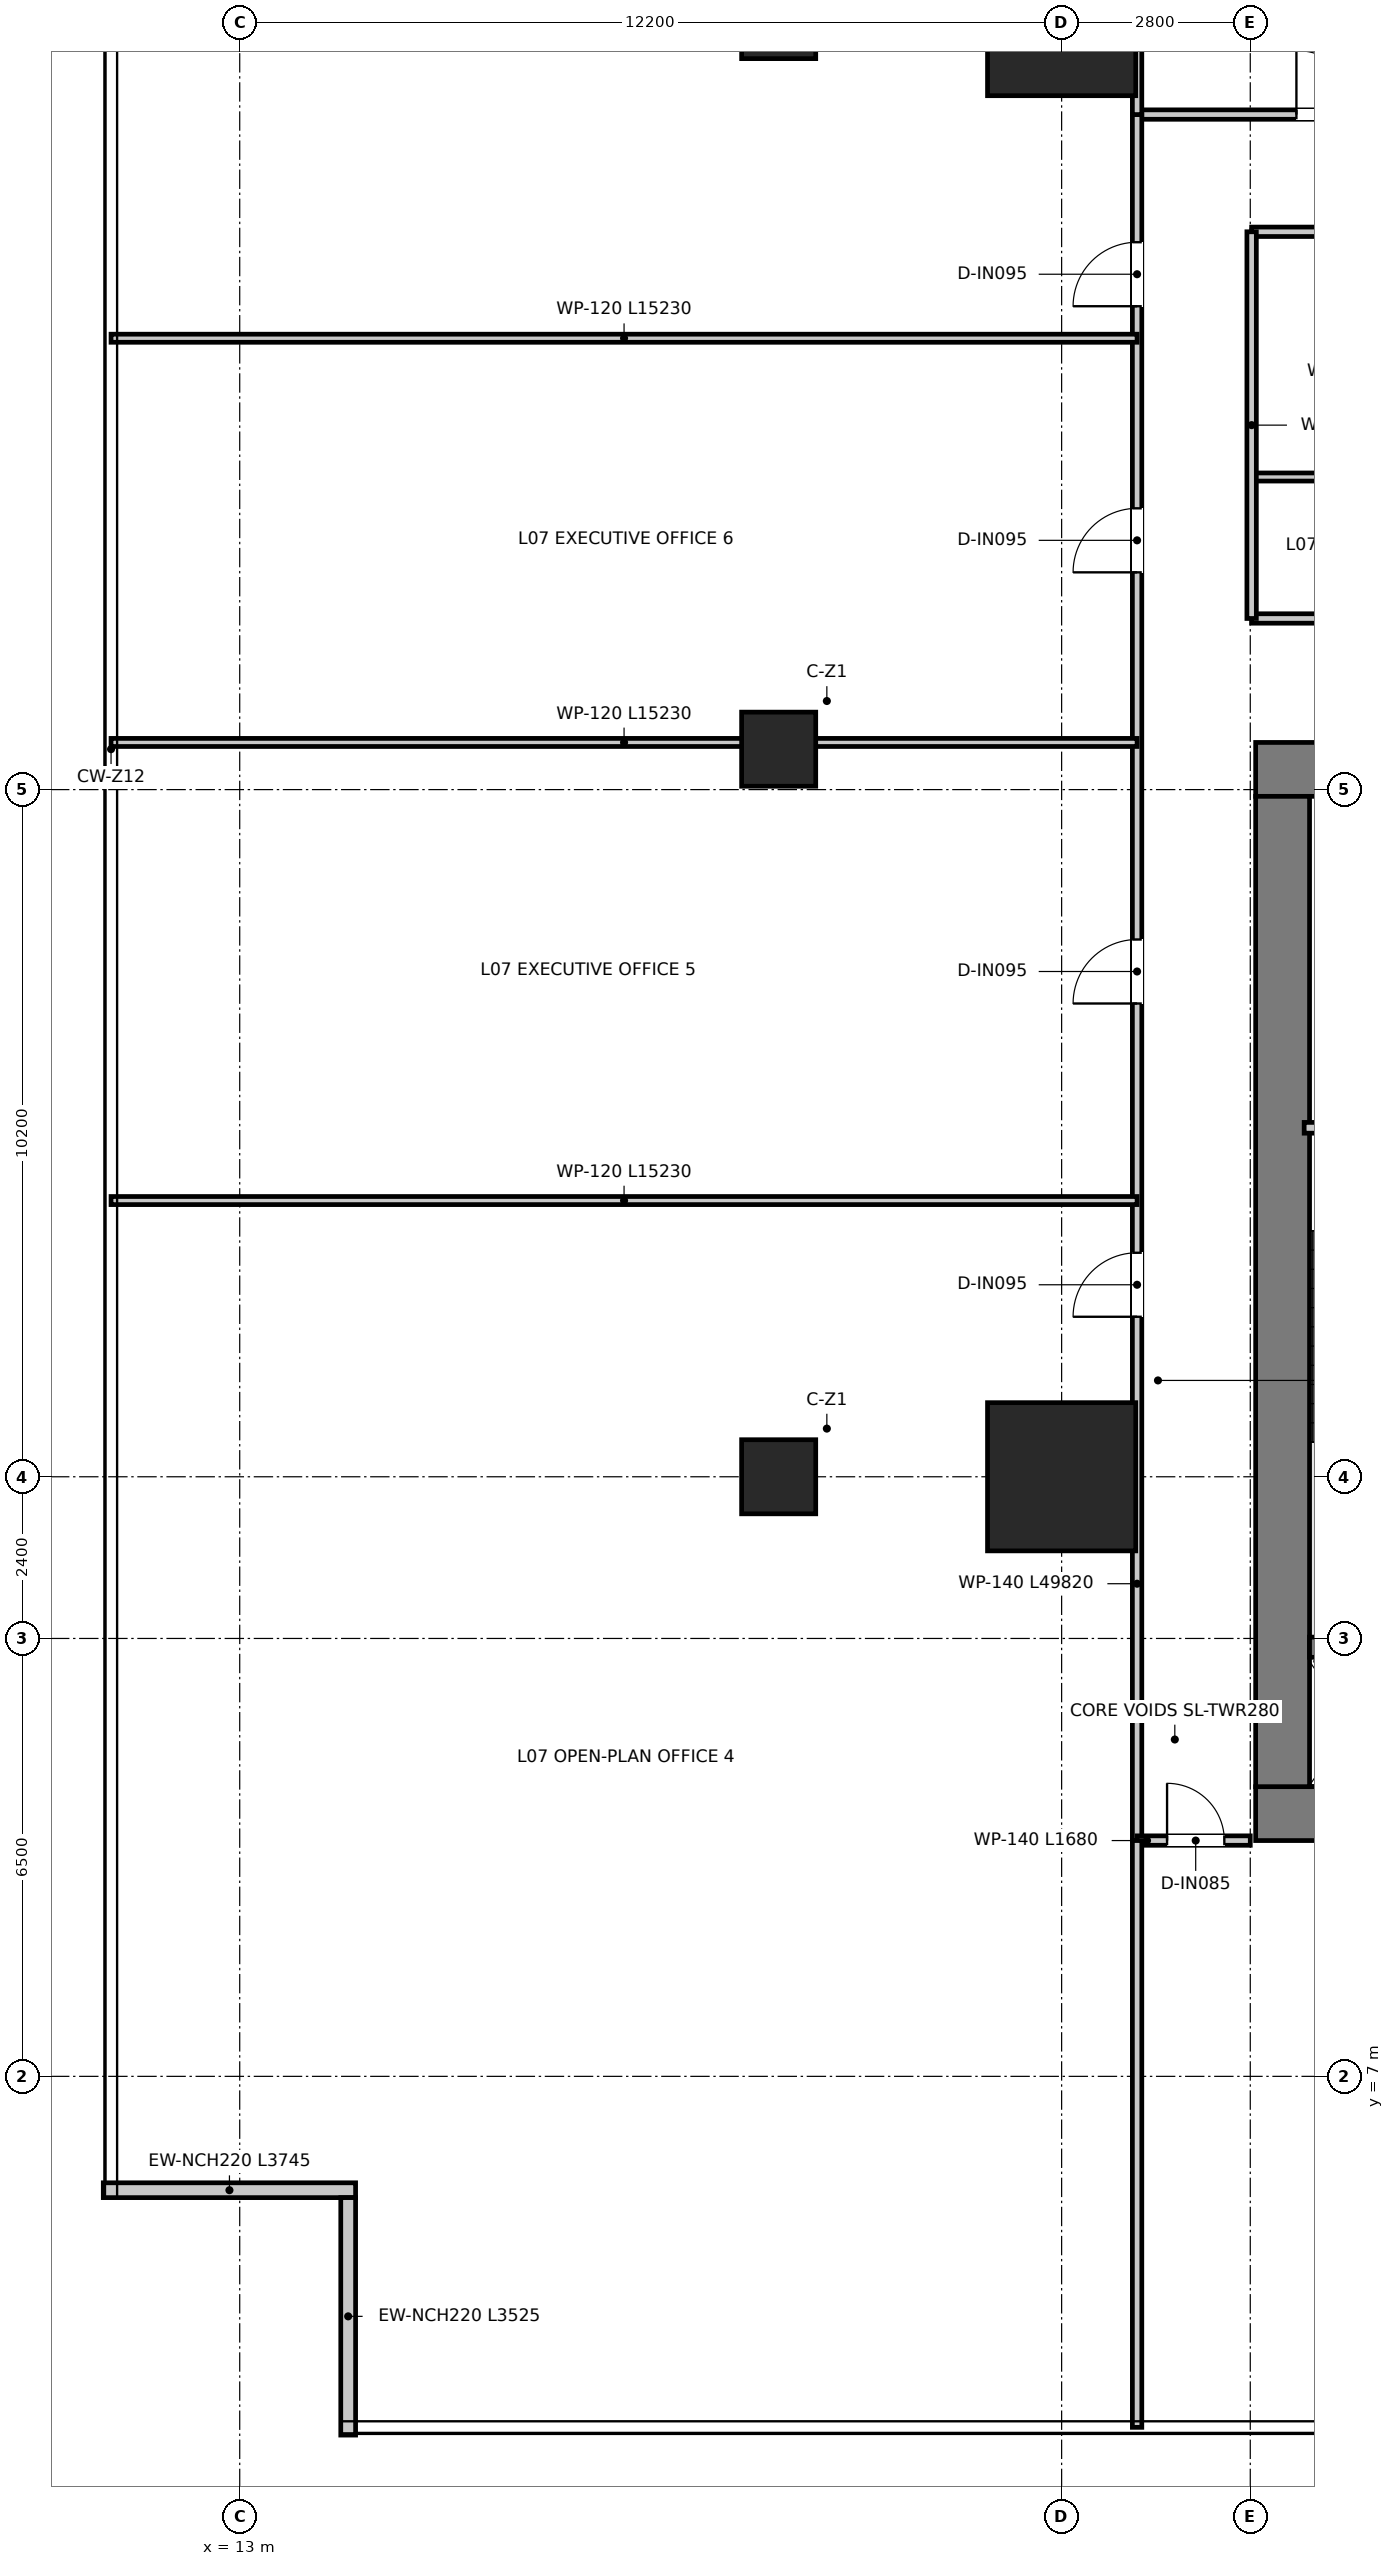
"""IFC4 building model, lengths in metres.
Left out: names, types, materials, properties, quantities, classifications, styles, units other than length and angle.
Written with IfcOpenShell. Run it as: python <this file> out.ifc"""

import sys

from ifc_helpers import new_model, si_unit, direction, frame, frame_2d, origin, origin_2d, place, context, subcontext, project, spatial, rectangle, extrude, source, transform, mapped, element, fill, save


model = new_model("IFC4")
c1 = context("Model", 3, precision=1e-05, world=origin(), true_north=direction((0.0, 1.0)))
c2 = subcontext(c1, "Body", "Model", "MODEL_VIEW")
j1 = project(units=[si_unit("LENGTHUNIT", "METRE"), si_unit("PLANEANGLEUNIT", "RADIAN")], contexts=[c1])
p1 = place(None, origin())
s1 = spatial("IfcSite", under=j1, at=p1, CompositionType="ELEMENT")
p2 = place(p1, origin())
s2 = spatial("IfcBuilding", under=s1, at=p2, CompositionType="ELEMENT")
p3 = place(p2, frame((0.0, 0.0, 32.9)))
s3 = spatial("IfcBuildingStorey", under=s2, at=p3, CompositionType="ELEMENT", Elevation=32.9)
p4 = place(p3, frame((28.08, 10.9, 0.0), z_axis=(0.0, 0.0, 1.0), x_axis=(1.0, 0.0, 0.0)))
e1 = element("IfcWall", 1, at=p4, inside=s3, PredefinedType="SHEAR", context=c2, shape_type="SweptSolid", body=[
    extrude(rectangle(XDim=15.84, YDim=0.8, at=frame_2d((7.92, 0.0))), origin(), (0.0, 0.0, 1.0), 3.95),
])
p5 = place(p3, frame((28.08, 26.4, 0.0), z_axis=(0.0, 0.0, 1.0), x_axis=(1.0, 0.0, 0.0)))
e2 = element("IfcWall", 2, at=p5, inside=s3, PredefinedType="SHEAR", context=c2, shape_type="SweptSolid", body=[
    extrude(rectangle(XDim=15.84, YDim=0.8, at=frame_2d((7.92, 0.0))), origin(), (0.0, 0.0, 1.0), 3.95),
])
p6 = place(p5, frame((7.22, 0.0, 0.0)))
e3 = element("IfcOpeningElement", 3, at=p6, cuts=e2, PredefinedType="OPENING", context=c2, shape_type="SweptSolid", body=[
    extrude(rectangle(XDim=1.4, YDim=2.2, at=frame_2d((0.7, 1.1))), frame((0.0, 0.41, 0.0), z_axis=(0.0, -1.0, 0.0), x_axis=(1.0, 0.0, 0.0)), (0.0, 0.0, 1.0), 0.82),
])
p7 = place(p5, frame((1.775, 0.0, 0.0)))
e4 = element("IfcOpeningElement", 4, at=p7, cuts=e2, PredefinedType="OPENING", context=c2, shape_type="SweptSolid", body=[
    extrude(rectangle(XDim=1.05, YDim=2.1, at=frame_2d((0.525, 1.05))), frame((0.0, 0.41, 0.0), z_axis=(0.0, -1.0, 0.0), x_axis=(1.0, 0.0, 0.0)), (0.0, 0.0, 1.0), 0.82),
])
p8 = place(p5, frame((13.015, 0.0, 0.0)))
e5 = element("IfcOpeningElement", 5, at=p8, cuts=e2, PredefinedType="OPENING", context=c2, shape_type="SweptSolid", body=[
    extrude(rectangle(XDim=1.05, YDim=2.1, at=frame_2d((0.525, 1.05))), frame((0.0, 0.41, 0.0), z_axis=(0.0, -1.0, 0.0), x_axis=(1.0, 0.0, 0.0)), (0.0, 0.0, 1.0), 0.82),
])
p9 = place(p3, frame((28.48, 11.3, 0.0), z_axis=(0.0, 0.0, 1.0), x_axis=(0.0, 1.0, 0.0)))
e6 = element("IfcWall", 6, at=p9, inside=s3, PredefinedType="SHEAR", context=c2, shape_type="SweptSolid", body=[
    extrude(rectangle(XDim=14.7, YDim=0.8, at=frame_2d((7.35, 0.0))), origin(), (0.0, 0.0, 1.0), 3.95),
])
p10 = place(p3, frame((28.88, 13.37, 0.0), z_axis=(0.0, 0.0, 1.0), x_axis=(1.0, 0.0, 0.0)))
e7 = element("IfcWall", 7, at=p10, inside=s3, PredefinedType="SHEAR", context=c2, shape_type="SweptSolid", body=[
    extrude(rectangle(XDim=3.1, YDim=0.3, at=frame_2d((1.55, 0.0))), origin(), (0.0, 0.0, 1.0), 3.95),
])
m1 = source(origin(), c2, "Body", "SweptSolid", [
    extrude(rectangle(XDim=2.2, YDim=2.2, at=origin_2d()), origin(), (0.0, 0.0, 1.0), 3.95),
])
for number, where, z_axis, x_axis in (
    (8, (25.2, 15.9, 0.0), (0.0, 0.0, 1.0), (1.0, 0.0, 0.0)),
    (9, (25.2, 37.5, 0.0), (0.0, 0.0, 1.0), (1.0, 0.0, 0.0)),
):
    element("IfcColumn", number, at=place(p3, frame(where, z_axis=z_axis, x_axis=x_axis)), inside=s3, PredefinedType="USERDEFINED", context=c2, shape_type="MappedRepresentation", body=[
        mapped(m1, transform((0.0, 0.0, 0.0), x_axis=(1.0, 0.0, 0.0), y_axis=(0.0, 1.0, 0.0), z_axis=(0.0, 0.0, 1.0), scale=1.0)),
    ])
m2 = source(origin(), c2, "Body", "SweptSolid", [
    extrude(rectangle(XDim=1.1, YDim=1.1, at=origin_2d()), origin(), (0.0, 0.0, 1.0), 3.95),
])
for number, where, z_axis, x_axis in (
    (10, (21.0, 15.9, 0.0), (0.0, 0.0, 1.0), (1.0, 0.0, 0.0)),
    (11, (21.0, 26.7, 0.0), (0.0, 0.0, 1.0), (1.0, 0.0, 0.0)),
    (12, (21.0, 37.5, 0.0), (0.0, 0.0, 1.0), (1.0, 0.0, 0.0)),
):
    element("IfcColumn", number, at=place(p3, frame(where, z_axis=z_axis, x_axis=x_axis)), inside=s3, PredefinedType="COLUMN", context=c2, shape_type="MappedRepresentation", body=[
        mapped(m2, transform((0.0, 0.0, 0.0), x_axis=(1.0, 0.0, 0.0), y_axis=(0.0, 1.0, 0.0), z_axis=(0.0, 0.0, 1.0), scale=1.0)),
    ])
p11 = place(p3, frame((10.975, 5.31, 0.0), z_axis=(0.0, 0.0, 1.0), x_axis=(1.0, 0.0, 0.0)))
e13 = element("IfcWall", 13, at=p11, inside=s3, PredefinedType="ELEMENTEDWALL", context=c2, shape_type="SweptSolid", body=[
    extrude(rectangle(XDim=3.745, YDim=0.22, at=frame_2d((1.873, 0.0))), origin(), (0.0, 0.0, 1.0), 3.67),
])
p12 = place(p3, frame((14.61, 5.2, 0.0), z_axis=(0.0, 0.0, 1.0), x_axis=(0.0, -1.0, 0.0)))
e14 = element("IfcWall", 14, at=p12, inside=s3, PredefinedType="ELEMENTEDWALL", context=c2, shape_type="SweptSolid", body=[
    extrude(rectangle(XDim=3.525, YDim=0.22, at=frame_2d((1.762, 0.0))), origin(), (0.0, 0.0, 1.0), 3.67),
])
p13 = place(p3, frame((28.8, 21.08, 0.0), z_axis=(0.0, 0.0, 1.0), x_axis=(1.0, 0.0, 0.0)))
e15 = element("IfcWall", 15, at=p13, inside=s3, PredefinedType="PARTITIONING", context=c2, shape_type="SweptSolid", body=[
    extrude(rectangle(XDim=3.16, YDim=0.16, at=frame_2d((1.58, 0.0))), origin(), (0.0, 0.0, 1.0), 3.67),
])
p14 = place(p13, frame((1.055, 0.0, 0.0)))
e16 = element("IfcOpeningElement", 16, at=p14, cuts=e15, PredefinedType="OPENING", context=c2, shape_type="SweptSolid", body=[
    extrude(rectangle(XDim=1.05, YDim=2.1, at=frame_2d((0.525, 1.05))), frame((0.0, 0.09, 0.0), z_axis=(0.0, -1.0, 0.0), x_axis=(1.0, 0.0, 0.0)), (0.0, 0.0, 1.0), 0.18),
])
p15 = place(p3, frame((28.02, 28.64, 0.0), z_axis=(0.0, 0.0, 1.0), x_axis=(1.0, 0.0, 0.0)))
e17 = element("IfcWall", 17, at=p15, inside=s3, PredefinedType="PARTITIONING", context=c2, shape_type="SweptSolid", body=[
    extrude(rectangle(XDim=15.96, YDim=0.14, at=frame_2d((7.98, 0.0))), origin(), (0.0, 0.0, 1.0), 3.08),
])
p16 = place(p15, frame((7.455, 0.0, 0.0)))
e18 = element("IfcOpeningElement", 18, at=p16, cuts=e17, PredefinedType="OPENING", context=c2, shape_type="SweptSolid", body=[
    extrude(rectangle(XDim=1.05, YDim=2.15, at=frame_2d((0.525, 1.075))), frame((0.0, 0.08, 0.0), z_axis=(0.0, -1.0, 0.0), x_axis=(1.0, 0.0, 0.0)), (0.0, 0.0, 1.0), 0.16),
])
p17 = place(p3, frame((28.02, 30.74, 0.0), z_axis=(0.0, 0.0, 1.0), x_axis=(1.0, 0.0, 0.0)))
e19 = element("IfcWall", 19, at=p17, inside=s3, PredefinedType="PARTITIONING", context=c2, shape_type="SweptSolid", body=[
    extrude(rectangle(XDim=15.96, YDim=0.12, at=frame_2d((7.98, 0.0))), origin(), (0.0, 0.0, 1.0), 3.08),
])
p18 = place(p3, frame((28.02, 34.38, 0.0), z_axis=(0.0, 0.0, 1.0), x_axis=(1.0, 0.0, 0.0)))
e20 = element("IfcWall", 20, at=p18, inside=s3, PredefinedType="PARTITIONING", context=c2, shape_type="SweptSolid", body=[
    extrude(rectangle(XDim=15.96, YDim=0.14, at=frame_2d((7.98, 0.0))), origin(), (0.0, 0.0, 1.0), 3.08),
])
p19 = place(p18, frame((1.13, 0.0, 0.0)))
e21 = element("IfcOpeningElement", 21, at=p19, cuts=e20, PredefinedType="OPENING", context=c2, shape_type="SweptSolid", body=[
    extrude(rectangle(XDim=0.9, YDim=2.1, at=frame_2d((0.45, 1.05))), frame((0.0, 0.08, 0.0), z_axis=(0.0, -1.0, 0.0), x_axis=(1.0, 0.0, 0.0)), (0.0, 0.0, 1.0), 0.16),
])
p20 = place(p18, frame((4.33, 0.0, 0.0)))
e22 = element("IfcOpeningElement", 22, at=p20, cuts=e20, PredefinedType="OPENING", context=c2, shape_type="SweptSolid", body=[
    extrude(rectangle(XDim=0.9, YDim=2.1, at=frame_2d((0.45, 1.05))), frame((0.0, 0.08, 0.0), z_axis=(0.0, -1.0, 0.0), x_axis=(1.0, 0.0, 0.0)), (0.0, 0.0, 1.0), 0.16),
])
p21 = place(p18, frame((7.355, 0.0, 0.0)))
e23 = element("IfcOpeningElement", 23, at=p21, cuts=e20, PredefinedType="OPENING", context=c2, shape_type="SweptSolid", body=[
    extrude(rectangle(XDim=0.95, YDim=2.1, at=frame_2d((0.475, 1.05))), frame((0.0, 0.08, 0.0), z_axis=(0.0, -1.0, 0.0), x_axis=(1.0, 0.0, 0.0)), (0.0, 0.0, 1.0), 0.16),
])
p22 = place(p18, frame((12.23, 0.0, 0.0)))
e24 = element("IfcOpeningElement", 24, at=p22, cuts=e20, PredefinedType="OPENING", context=c2, shape_type="SweptSolid", body=[
    extrude(rectangle(XDim=0.95, YDim=2.1, at=frame_2d((0.475, 1.05))), frame((0.0, 0.08, 0.0), z_axis=(0.0, -1.0, 0.0), x_axis=(1.0, 0.0, 0.0)), (0.0, 0.0, 1.0), 0.16),
])
p23 = place(p3, frame((28.02, 28.64, 0.0), z_axis=(0.0, 0.0, 1.0), x_axis=(0.0, 1.0, 0.0)))
e25 = element("IfcWall", 25, at=p23, inside=s3, PredefinedType="PARTITIONING", context=c2, shape_type="SweptSolid", body=[
    extrude(rectangle(XDim=5.74, YDim=0.14, at=frame_2d((2.87, 0.0))), origin(), (0.0, 0.0, 1.0), 3.22),
])
p24 = place(p3, frame((26.32, 36.12, 0.0), z_axis=(0.0, 0.0, 1.0), x_axis=(1.0, 0.0, 0.0)))
e26 = element("IfcWall", 26, at=p24, inside=s3, PredefinedType="PARTITIONING", context=c2, shape_type="SweptSolid", body=[
    extrude(rectangle(XDim=19.36, YDim=0.14, at=frame_2d((9.68, 0.0))), origin(), (0.0, 0.0, 1.0), 3.08),
])
p25 = place(p24, frame((2.365, 0.0, 0.0)))
e27 = element("IfcOpeningElement", 27, at=p25, cuts=e26, PredefinedType="OPENING", context=c2, shape_type="SweptSolid", body=[
    extrude(rectangle(XDim=0.95, YDim=2.1, at=frame_2d((0.475, 1.05))), frame((0.0, 0.08, 0.0), z_axis=(0.0, -1.0, 0.0), x_axis=(1.0, 0.0, 0.0)), (0.0, 0.0, 1.0), 0.16),
])
p26 = place(p24, frame((9.205, 0.0, 0.0)))
e28 = element("IfcOpeningElement", 28, at=p26, cuts=e26, PredefinedType="OPENING", context=c2, shape_type="SweptSolid", body=[
    extrude(rectangle(XDim=0.95, YDim=2.1, at=frame_2d((0.475, 1.05))), frame((0.0, 0.08, 0.0), z_axis=(0.0, -1.0, 0.0), x_axis=(1.0, 0.0, 0.0)), (0.0, 0.0, 1.0), 0.16),
])
p27 = place(p24, frame((16.045, 0.0, 0.0)))
e29 = element("IfcOpeningElement", 29, at=p27, cuts=e26, PredefinedType="OPENING", context=c2, shape_type="SweptSolid", body=[
    extrude(rectangle(XDim=0.95, YDim=2.1, at=frame_2d((0.475, 1.05))), frame((0.0, 0.08, 0.0), z_axis=(0.0, -1.0, 0.0), x_axis=(1.0, 0.0, 0.0)), (0.0, 0.0, 1.0), 0.16),
])
p28 = place(p3, frame((26.32, 10.5, 0.0), z_axis=(0.0, 0.0, 1.0), x_axis=(0.0, 1.0, 0.0)))
e30 = element("IfcWall", 30, at=p28, inside=s3, PredefinedType="PARTITIONING", context=c2, shape_type="SweptSolid", body=[
    extrude(rectangle(XDim=25.62, YDim=0.14, at=frame_2d((12.81, 0.0))), origin(), (0.0, 0.0, 1.0), 2.97),
])
p29 = place(p28, frame((7.775, 0.0, 0.0)))
e31 = element("IfcOpeningElement", 31, at=p29, cuts=e30, PredefinedType="OPENING", context=c2, shape_type="SweptSolid", body=[
    extrude(rectangle(XDim=0.95, YDim=2.1, at=frame_2d((0.475, 1.05))), frame((0.0, 0.08, 0.0), z_axis=(0.0, -1.0, 0.0), x_axis=(1.0, 0.0, 0.0)), (0.0, 0.0, 1.0), 0.16),
])
p30 = place(p28, frame((12.425, 0.0, 0.0)))
e32 = element("IfcOpeningElement", 32, at=p30, cuts=e30, PredefinedType="OPENING", context=c2, shape_type="SweptSolid", body=[
    extrude(rectangle(XDim=0.95, YDim=2.1, at=frame_2d((0.475, 1.05))), frame((0.0, 0.08, 0.0), z_axis=(0.0, -1.0, 0.0), x_axis=(1.0, 0.0, 0.0)), (0.0, 0.0, 1.0), 0.16),
])
p31 = place(p28, frame((18.825, 0.0, 0.0)))
e33 = element("IfcOpeningElement", 33, at=p31, cuts=e30, PredefinedType="OPENING", context=c2, shape_type="SweptSolid", body=[
    extrude(rectangle(XDim=0.95, YDim=2.1, at=frame_2d((0.475, 1.05))), frame((0.0, 0.08, 0.0), z_axis=(0.0, -1.0, 0.0), x_axis=(1.0, 0.0, 0.0)), (0.0, 0.0, 1.0), 0.16),
])
p32 = place(p28, frame((22.775, 0.0, 0.0)))
e34 = element("IfcOpeningElement", 34, at=p32, cuts=e30, PredefinedType="OPENING", context=c2, shape_type="SweptSolid", body=[
    extrude(rectangle(XDim=0.95, YDim=2.1, at=frame_2d((0.475, 1.05))), frame((0.0, 0.08, 0.0), z_axis=(0.0, -1.0, 0.0), x_axis=(1.0, 0.0, 0.0)), (0.0, 0.0, 1.0), 0.16),
])
p33 = place(p3, frame((26.32, 10.5, 0.0), z_axis=(0.0, 0.0, 1.0), x_axis=(1.0, 0.0, 0.0)))
e35 = element("IfcWall", 35, at=p33, inside=s3, PredefinedType="PARTITIONING", context=c2, shape_type="SweptSolid", body=[
    extrude(rectangle(XDim=1.68, YDim=0.14, at=frame_2d((0.84, 0.0))), origin(), (0.0, 0.0, 1.0), 3.67),
])
p34 = place(p33, frame((0.445, 0.0, 0.0)))
e36 = element("IfcOpeningElement", 36, at=p34, cuts=e35, PredefinedType="OPENING", context=c2, shape_type="SweptSolid", body=[
    extrude(rectangle(XDim=0.85, YDim=2.1, at=frame_2d((0.425, 1.05))), frame((0.0, 0.08, 0.0), z_axis=(0.0, -1.0, 0.0), x_axis=(1.0, 0.0, 0.0)), (0.0, 0.0, 1.0), 0.16),
])
p35 = place(p3, frame((26.32, 36.12, 0.0), z_axis=(0.0, 0.0, 1.0), x_axis=(0.0, 1.0, 0.0)))
e37 = element("IfcWall", 37, at=p35, inside=s3, PredefinedType="PARTITIONING", context=c2, shape_type="SweptSolid", body=[
    extrude(rectangle(XDim=15.49, YDim=0.14, at=frame_2d((7.745, 0.0))), origin(), (0.0, 0.0, 1.0), 2.97),
])
p36 = place(p3, frame((26.32, 1.79, 0.0), z_axis=(0.0, 0.0, 1.0), x_axis=(0.0, 1.0, 0.0)))
e38 = element("IfcWall", 38, at=p36, inside=s3, PredefinedType="PARTITIONING", context=c2, shape_type="SweptSolid", body=[
    extrude(rectangle(XDim=8.71, YDim=0.14, at=frame_2d((4.355, 0.0))), origin(), (0.0, 0.0, 1.0), 3.67),
])
for number, where, z_axis, x_axis in (
    (39, (11.09, 20.0, 0.0), (0.0, 0.0, 1.0), (1.0, 0.0, 0.0)),
    (40, (11.09, 26.8, 0.0), (0.0, 0.0, 1.0), (1.0, 0.0, 0.0)),
    (41, (11.09, 32.8, 0.0), (0.0, 0.0, 1.0), (1.0, 0.0, 0.0)),
):
    element("IfcWall", number, at=place(p3, frame(where, z_axis=z_axis, x_axis=x_axis)), inside=s3, PredefinedType="PARTITIONING", context=c2, shape_type="SweptSolid", body=[
        extrude(rectangle(XDim=15.23, YDim=0.12, at=frame_2d((7.615, 0.0))), origin(), (0.0, 0.0, 1.0), 2.97),
    ])
p37 = place(p25, origin())
e42 = element("IfcDoor", 42, at=p37, inside=s3, OperationType="SINGLE_SWING_LEFT", PredefinedType="DOOR", context=c2, shape_type="SweptSolid", body=[
    extrude(rectangle(XDim=0.95, YDim=2.1, at=frame_2d((0.475, 1.05))), frame((0.0, 0.025, 0.0), z_axis=(0.0, -1.0, 0.0), x_axis=(1.0, 0.0, 0.0)), (0.0, 0.0, 1.0), 0.05),
])
fill(e27, e42)
p38 = place(p29, origin())
e43 = element("IfcDoor", 43, at=p38, inside=s3, OperationType="SINGLE_SWING_LEFT", PredefinedType="DOOR", context=c2, shape_type="SweptSolid", body=[
    extrude(rectangle(XDim=0.95, YDim=2.1, at=frame_2d((0.475, 1.05))), frame((0.0, 0.025, 0.0), z_axis=(0.0, -1.0, 0.0), x_axis=(1.0, 0.0, 0.0)), (0.0, 0.0, 1.0), 0.05),
])
fill(e31, e43)
p39 = place(p30, origin())
e44 = element("IfcDoor", 44, at=p39, inside=s3, OperationType="SINGLE_SWING_LEFT", PredefinedType="DOOR", context=c2, shape_type="SweptSolid", body=[
    extrude(rectangle(XDim=0.95, YDim=2.1, at=frame_2d((0.475, 1.05))), frame((0.0, 0.025, 0.0), z_axis=(0.0, -1.0, 0.0), x_axis=(1.0, 0.0, 0.0)), (0.0, 0.0, 1.0), 0.05),
])
fill(e32, e44)
p40 = place(p31, origin())
e45 = element("IfcDoor", 45, at=p40, inside=s3, OperationType="SINGLE_SWING_LEFT", PredefinedType="DOOR", context=c2, shape_type="SweptSolid", body=[
    extrude(rectangle(XDim=0.95, YDim=2.1, at=frame_2d((0.475, 1.05))), frame((0.0, 0.025, 0.0), z_axis=(0.0, -1.0, 0.0), x_axis=(1.0, 0.0, 0.0)), (0.0, 0.0, 1.0), 0.05),
])
fill(e33, e45)
p41 = place(p32, origin())
e46 = element("IfcDoor", 46, at=p41, inside=s3, OperationType="SINGLE_SWING_LEFT", PredefinedType="DOOR", context=c2, shape_type="SweptSolid", body=[
    extrude(rectangle(XDim=0.95, YDim=2.1, at=frame_2d((0.475, 1.05))), frame((0.0, 0.025, 0.0), z_axis=(0.0, -1.0, 0.0), x_axis=(1.0, 0.0, 0.0)), (0.0, 0.0, 1.0), 0.05),
])
fill(e34, e46)
p42 = place(p34, origin())
e47 = element("IfcDoor", 47, at=p42, inside=s3, OperationType="SINGLE_SWING_LEFT", PredefinedType="DOOR", context=c2, shape_type="SweptSolid", body=[
    extrude(rectangle(XDim=0.85, YDim=2.1, at=frame_2d((0.425, 1.05))), frame((0.0, 0.025, 0.0), z_axis=(0.0, -1.0, 0.0), x_axis=(1.0, 0.0, 0.0)), (0.0, 0.0, 1.0), 0.05),
])
fill(e36, e47)
save(model, sys.argv[1])
